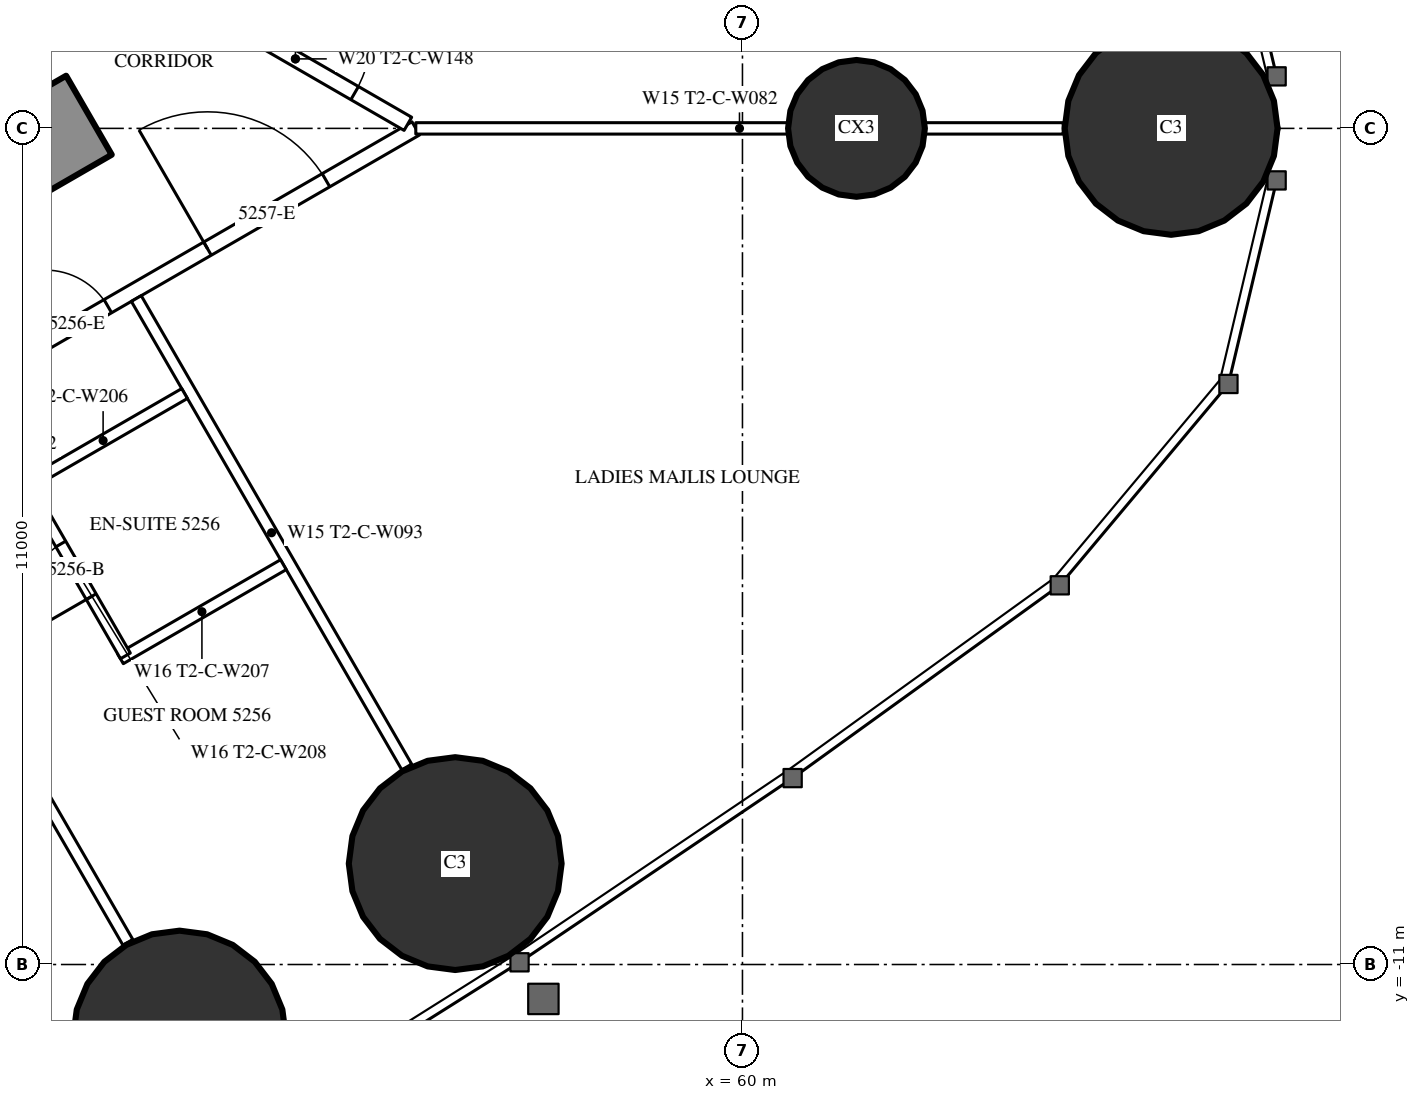
"""IFC4 building model, lengths in metres.
Left out: names, types, materials, properties, quantities, classifications, styles, units other than length and angle.
Written with IfcOpenShell. Run it as: python <this file> out.ifc"""

import sys

from ifc_helpers import new_model, si_unit, direction, frame, frame_2d, origin, origin_2d, place, context, subcontext, project, spatial, rectangle, circle, extrude, element, fill, save


model = new_model("IFC4")
c1 = context("Model", 3, precision=1e-05, world=origin(), true_north=direction((0.0, 1.0)))
c2 = subcontext(c1, "Body", "Model", "MODEL_VIEW")
j1 = project(units=[si_unit("LENGTHUNIT", "METRE"), si_unit("PLANEANGLEUNIT", "RADIAN")], contexts=[c1])
p1 = place(None, origin())
s1 = spatial("IfcSite", under=j1, at=p1, CompositionType="ELEMENT")
p2 = place(p1, origin())
s2 = spatial("IfcBuilding", under=s1, at=p2, CompositionType="ELEMENT")
p3 = place(p2, frame((0.0, 0.0, 194.8)))
s3 = spatial("IfcBuildingStorey", under=s2, at=p3, CompositionType="ELEMENT", Elevation=194.8)
for number, where, z_axis, x_axis in (
    (1, (65.64, 0.0, 0.0), (0.0, 0.0, 1.0), (1.0, 0.0, 0.0)),
    (2, (52.594, -11.955, 0.0), (0.0, 0.0, 1.0), (1.0, 0.0, 0.0)),
    (3, (56.221, -9.672, 0.0), (0.0, 0.0, 1.0), (1.0, 0.0, 0.0)),
):
    element("IfcColumn", number, at=place(p3, frame(where, z_axis=z_axis, x_axis=x_axis)), inside=s3, PredefinedType="COLUMN", context=c2, shape_type="SweptSolid", body=[
        extrude(circle(Radius=1.4, at=origin_2d()), origin(), (0.0, 0.0, 1.0), 3.5),
    ])
p4 = place(p3, frame((61.5, 0.0, 0.0), z_axis=(0.0, 0.0, 1.0), x_axis=(1.0, 0.0, 0.0)))
e4 = element("IfcColumn", 4, at=p4, inside=s3, PredefinedType="COLUMN", context=c2, shape_type="SweptSolid", body=[
    extrude(circle(Radius=0.9, at=origin_2d()), origin(), (0.0, 0.0, 1.0), 3.5),
])
p5 = place(p3, frame((27.2, -13.8, 0.0), z_axis=(0.0, 0.0, 1.0), x_axis=(0.866027159892, 0.499996958321, 0.0)))
e5 = element("IfcWall", 5, at=p5, inside=s3, PredefinedType="SHEAR", context=c2, shape_type="SweptSolid", body=[
    extrude(rectangle(XDim=27.947, YDim=1.2, at=frame_2d((13.973, 0.0))), origin(), (0.0, 0.0, 1.0), 3.5),
])
p6 = place(p5, frame((4.6, 0.0, 0.0)))
e6 = element("IfcOpeningElement", 6, at=p6, cuts=e5, PredefinedType="OPENING", context=c2, shape_type="SweptSolid", body=[
    extrude(rectangle(XDim=1.0, YDim=2.2, at=frame_2d((0.5, 1.1))), frame((0.0, 0.61, 0.0), z_axis=(0.0, -1.0, 0.0), x_axis=(1.0, 0.0, 0.0)), (0.0, 0.0, 1.0), 1.22),
])
p7 = place(p5, frame((13.395, 0.0, 0.0)))
e7 = element("IfcOpeningElement", 7, at=p7, cuts=e5, PredefinedType="OPENING", context=c2, shape_type="SweptSolid", body=[
    extrude(rectangle(XDim=1.8, YDim=2.2, at=frame_2d((0.9, 1.1))), frame((0.0, 0.61, 0.0), z_axis=(0.0, -1.0, 0.0), x_axis=(1.0, 0.0, 0.0)), (0.0, 0.0, 1.0), 1.22),
])
p8 = place(p3, frame((27.959, -16.017, 0.0), z_axis=(0.0, 0.0, 1.0), x_axis=(0.866024151371, 0.500002169237, 0.0)))
e8 = element("IfcWall", 8, at=p8, inside=s3, PredefinedType="PARTITIONING", context=c2, shape_type="SweptSolid", body=[
    extrude(rectangle(XDim=32.034, YDim=0.2, at=frame_2d((16.017, 0.0))), origin(), (0.0, 0.0, 1.0), 3.25),
])
p9 = place(p8, frame((0.6, 0.0, 0.0)))
e9 = element("IfcOpeningElement", 9, at=p9, cuts=e8, PredefinedType="OPENING", context=c2, shape_type="SweptSolid", body=[
    extrude(rectangle(XDim=0.95, YDim=2.2, at=frame_2d((0.475, 1.1))), frame((0.0, 0.11, 0.0), z_axis=(0.0, -1.0, 0.0), x_axis=(1.0, 0.0, 0.0)), (0.0, 0.0, 1.0), 0.22),
])
p10 = place(p8, frame((13.132, 0.0, 0.0)))
e10 = element("IfcOpeningElement", 10, at=p10, cuts=e8, PredefinedType="OPENING", context=c2, shape_type="SweptSolid", body=[
    extrude(rectangle(XDim=0.95, YDim=2.2, at=frame_2d((0.475, 1.1))), frame((0.0, 0.11, 0.0), z_axis=(0.0, -1.0, 0.0), x_axis=(1.0, 0.0, 0.0)), (0.0, 0.0, 1.0), 0.22),
])
p11 = place(p8, frame((15.391, 0.0, 0.0)))
e11 = element("IfcOpeningElement", 11, at=p11, cuts=e8, PredefinedType="OPENING", context=c2, shape_type="SweptSolid", body=[
    extrude(rectangle(XDim=0.95, YDim=2.2, at=frame_2d((0.475, 1.1))), frame((0.0, 0.11, 0.0), z_axis=(0.0, -1.0, 0.0), x_axis=(1.0, 0.0, 0.0)), (0.0, 0.0, 1.0), 0.22),
])
p12 = place(p8, frame((19.441, 0.0, 0.0)))
e12 = element("IfcOpeningElement", 12, at=p12, cuts=e8, PredefinedType="OPENING", context=c2, shape_type="SweptSolid", body=[
    extrude(rectangle(XDim=0.95, YDim=2.2, at=frame_2d((0.475, 1.1))), frame((0.0, 0.11, 0.0), z_axis=(0.0, -1.0, 0.0), x_axis=(1.0, 0.0, 0.0)), (0.0, 0.0, 1.0), 0.22),
])
p13 = place(p8, frame((26.406, 0.0, 0.0)))
e13 = element("IfcOpeningElement", 13, at=p13, cuts=e8, PredefinedType="OPENING", context=c2, shape_type="SweptSolid", body=[
    extrude(rectangle(XDim=0.95, YDim=2.2, at=frame_2d((0.475, 1.1))), frame((0.0, 0.11, 0.0), z_axis=(0.0, -1.0, 0.0), x_axis=(1.0, 0.0, 0.0)), (0.0, 0.0, 1.0), 0.22),
])
p14 = place(p8, frame((28.87, 0.0, 0.0)))
e14 = element("IfcOpeningElement", 14, at=p14, cuts=e8, PredefinedType="OPENING", context=c2, shape_type="SweptSolid", body=[
    extrude(rectangle(XDim=1.8, YDim=2.2, at=frame_2d((0.9, 1.1))), frame((0.0, 0.11, 0.0), z_axis=(0.0, -1.0, 0.0), x_axis=(1.0, 0.0, 0.0)), (0.0, 0.0, 1.0), 0.22),
])
p15 = place(p3, frame((48.275, -4.404, 0.0), z_axis=(0.0, 0.0, 1.0), x_axis=(0.500006004368, -0.866021937133, 0.0)))
e15 = element("IfcWall", 15, at=p15, inside=s3, PredefinedType="PARTITIONING", context=c2, shape_type="SweptSolid", body=[
    extrude(rectangle(XDim=7.279, YDim=0.15, at=frame_2d((3.64, 0.0))), origin(), (0.0, 0.0, 1.0), 2.3),
])
p16 = place(p3, frame((52.025, -2.238, 0.0), z_axis=(0.0, 0.0, 1.0), x_axis=(0.499983785035, -0.866034765296, 0.0)))
e16 = element("IfcWall", 16, at=p16, inside=s3, PredefinedType="PARTITIONING", context=c2, shape_type="SweptSolid", body=[
    extrude(rectangle(XDim=7.116, YDim=0.15, at=frame_2d((3.558, 0.0))), origin(), (0.0, 0.0, 1.0), 2.3),
])
p17 = place(p3, frame((55.702, 0.0, 0.0), z_axis=(0.0, 0.0, 1.0), x_axis=(1.0, 0.0, 0.0)))
e17 = element("IfcWall", 17, at=p17, inside=s3, PredefinedType="PARTITIONING", context=c2, shape_type="SweptSolid", body=[
    extrude(rectangle(XDim=8.518, YDim=0.15, at=frame_2d((4.259, 0.0))), origin(), (0.0, 0.0, 1.0), 2.3),
])
p18 = place(p3, frame((52.639, 1.769, 0.0), z_axis=(0.0, 0.0, 1.0), x_axis=(0.866027340901, -0.4999966448, 0.0)))
e18 = element("IfcWall", 18, at=p18, inside=s3, PredefinedType="PARTITIONING", context=c2, shape_type="SweptSolid", body=[
    extrude(rectangle(XDim=3.417, YDim=0.2, at=frame_2d((1.708, 0.0))), origin(), (0.0, 0.0, 1.0), 3.25),
])
p19 = place(p18, frame((0.809, 0.0, 0.0)))
e19 = element("IfcOpeningElement", 19, at=p19, cuts=e18, PredefinedType="OPENING", context=c2, shape_type="SweptSolid", body=[
    extrude(rectangle(XDim=1.8, YDim=2.2, at=frame_2d((0.9, 1.1))), frame((0.0, 0.11, 0.0), z_axis=(0.0, -1.0, 0.0), x_axis=(1.0, 0.0, 0.0)), (0.0, 0.0, 1.0), 0.22),
])
p20 = place(p3, frame((51.817, -6.978, 0.0), z_axis=(0.0, 0.0, 1.0), x_axis=(0.866006523861, 0.500032699561, 0.0)))
e20 = element("IfcWall", 20, at=p20, inside=s3, PredefinedType="PARTITIONING", context=c2, shape_type="SweptSolid", body=[
    extrude(rectangle(XDim=2.475, YDim=0.15, at=frame_2d((1.237, 0.0))), origin(), (0.0, 0.0, 1.0), 3.25),
])
p21 = place(p3, frame((50.582, -4.688, 0.0), z_axis=(0.0, 0.0, 1.0), x_axis=(0.500006934395, -0.866021400173, 0.0)))
e21 = element("IfcWall", 21, at=p21, inside=s3, PredefinedType="PARTITIONING", context=c2, shape_type="SweptSolid", body=[
    extrude(rectangle(XDim=2.6, YDim=0.15, at=frame_2d((1.3, 0.0))), origin(), (0.0, 0.0, 1.0), 3.25),
])
p22 = place(p21, frame((0.9, 0.0, 0.0)))
e22 = element("IfcOpeningElement", 22, at=p22, cuts=e21, PredefinedType="OPENING", context=c2, shape_type="SweptSolid", body=[
    extrude(rectangle(XDim=0.8, YDim=2.2, at=frame_2d((0.4, 1.1))), frame((0.0, 0.085, 0.0), z_axis=(0.0, -1.0, 0.0), x_axis=(1.0, 0.0, 0.0)), (0.0, 0.0, 1.0), 0.17),
])
p23 = place(p3, frame((50.517, -4.726, 0.0), z_axis=(0.0, 0.0, 1.0), x_axis=(0.866031185235, 0.4999899861, 0.0)))
e23 = element("IfcWall", 23, at=p23, inside=s3, PredefinedType="PARTITIONING", context=c2, shape_type="SweptSolid", body=[
    extrude(rectangle(XDim=2.475, YDim=0.15, at=frame_2d((1.238, 0.0))), origin(), (0.0, 0.0, 1.0), 3.25),
])
p24 = place(p22, origin())
e24 = element("IfcDoor", 24, at=p24, inside=s3, OperationType="SINGLE_SWING_RIGHT", PredefinedType="DOOR", context=c2, shape_type="SweptSolid", body=[
    extrude(rectangle(XDim=0.8, YDim=2.2, at=frame_2d((0.4, 1.1))), frame((0.0, 0.025, 0.0), z_axis=(0.0, -1.0, 0.0), x_axis=(1.0, 0.0, 0.0)), (0.0, 0.0, 1.0), 0.05),
])
fill(e22, e24)
p25 = place(p13, origin())
e25 = element("IfcDoor", 25, at=p25, inside=s3, OperationType="SINGLE_SWING_LEFT", PredefinedType="DOOR", context=c2, shape_type="SweptSolid", body=[
    extrude(rectangle(XDim=0.95, YDim=2.2, at=frame_2d((0.475, 1.1))), frame((0.0, 0.025, 0.0), z_axis=(0.0, -1.0, 0.0), x_axis=(1.0, 0.0, 0.0)), (0.0, 0.0, 1.0), 0.05),
])
fill(e13, e25)
p26 = place(p14, origin())
e26 = element("IfcDoor", 26, at=p26, inside=s3, OperationType="DOUBLE_DOOR_SINGLE_SWING", PredefinedType="DOOR", context=c2, shape_type="SweptSolid", body=[
    extrude(rectangle(XDim=1.8, YDim=2.2, at=frame_2d((0.9, 1.1))), frame((0.0, 0.025, 0.0), z_axis=(0.0, -1.0, 0.0), x_axis=(1.0, 0.0, 0.0)), (0.0, 0.0, 1.0), 0.05),
])
fill(e14, e26)
p27 = place(p19, origin())
e27 = element("IfcDoor", 27, at=p27, inside=s3, OperationType="DOUBLE_DOOR_SINGLE_SWING", PredefinedType="DOOR", context=c2, shape_type="SweptSolid", body=[
    extrude(rectangle(XDim=1.8, YDim=2.2, at=frame_2d((0.9, 1.1))), frame((0.0, 0.025, 0.0), z_axis=(0.0, -1.0, 0.0), x_axis=(1.0, 0.0, 0.0)), (0.0, 0.0, 1.0), 0.05),
])
fill(e19, e27)
save(model, sys.argv[1])
